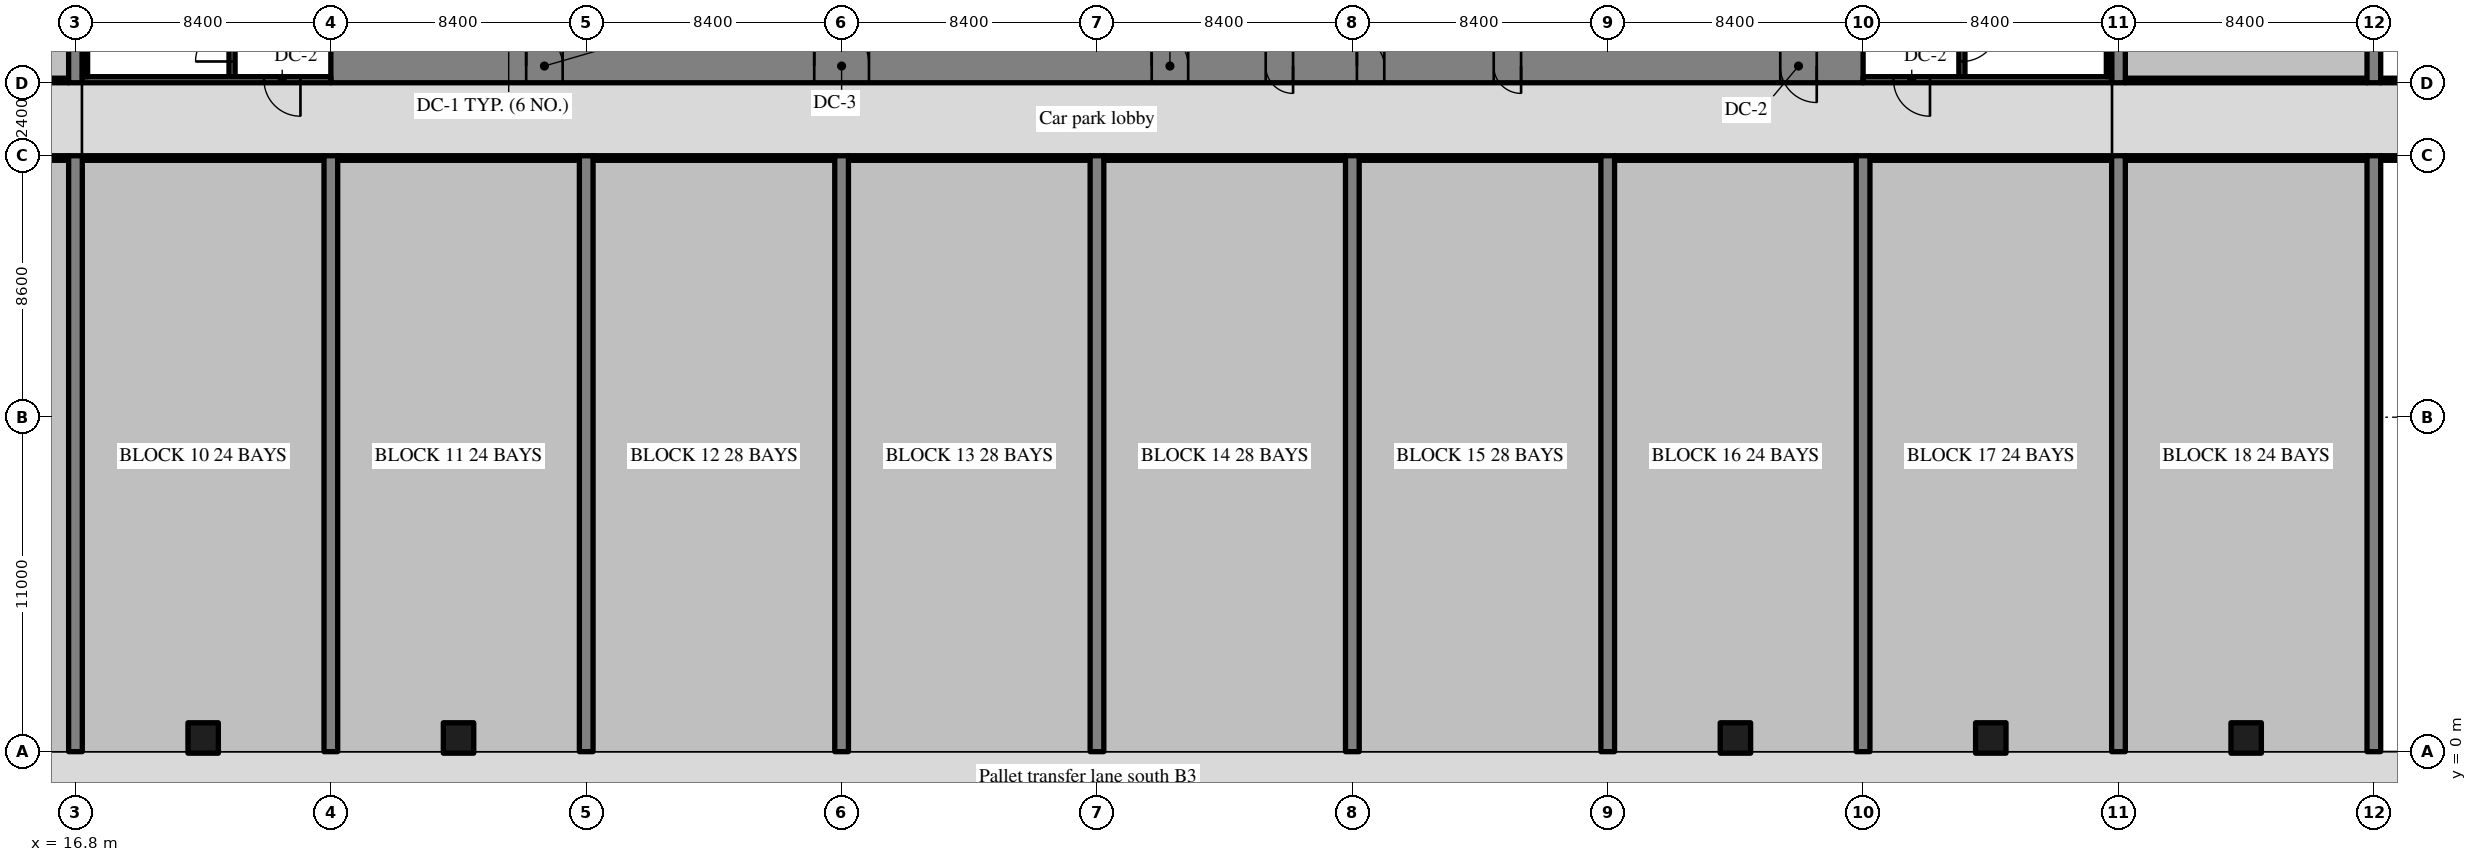
"""IFC4 building model, lengths in metres.
Left out: names, types, materials, properties, quantities, classifications, styles, units other than length and angle.
Written with IfcOpenShell. Run it as: python <this file> out.ifc"""

import sys

from ifc_helpers import new_model, si_unit, direction, frame, frame_2d, origin, origin_2d, place, context, subcontext, project, spatial, rectangle, extrude, source, transform, mapped, element, fill, save


model = new_model("IFC4")
c1 = context("Model", 3, precision=1e-05, world=origin(), true_north=direction((0.0, 1.0)))
c2 = subcontext(c1, "Body", "Model", "MODEL_VIEW")
j1 = project(units=[si_unit("LENGTHUNIT", "METRE"), si_unit("PLANEANGLEUNIT", "RADIAN")], contexts=[c1])
p1 = place(None, origin())
s1 = spatial("IfcSite", under=j1, at=p1, CompositionType="ELEMENT")
p2 = place(p1, origin())
s2 = spatial("IfcBuilding", under=s1, at=p2, CompositionType="ELEMENT")
p3 = place(p2, frame((0.0, 0.0, -13.5)))
s3 = spatial("IfcBuildingStorey", under=s2, at=p3, CompositionType="ELEMENT", Elevation=-13.5)
m1 = source(origin(), c2, "Body", "SweptSolid", [
    extrude(rectangle(XDim=50.4, YDim=1.1, at=frame_2d((25.2, 0.0))), origin(), (0.0, 0.0, 1.0), 4.52),
])
p4 = place(p3, frame((25.2, 22.55, -0.3), z_axis=(0.0, 0.0, 1.0), x_axis=(1.0, 0.0, 0.0)))
e1 = element("IfcWall", 1, at=p4, inside=s3, PredefinedType="SHEAR", context=c2, shape_type="MappedRepresentation", body=[
    mapped(m1, transform((0.0, 0.0, 0.0), scale=1.0)),
])
m2 = source(origin(), c2, "Body", "SweptSolid", [
    extrude(rectangle(XDim=1.8, YDim=2.1, at=frame_2d((0.9, 1.05))), frame((0.0, 0.56, 0.0), z_axis=(0.0, -1.0, 0.0), x_axis=(1.0, 0.0, 0.0)), (0.0, 0.0, 1.0), 1.12),
])
p5 = place(p4, frame((15.9, 0.0, 0.0)))
e2 = element("IfcOpeningElement", 2, at=p5, cuts=e1, PredefinedType="OPENING", context=c2, shape_type="MappedRepresentation", body=[
    mapped(m2, transform((0.0, 0.0, 0.0), scale=1.0)),
])
m3 = source(origin(), c2, "Body", "SweptSolid", [
    extrude(rectangle(XDim=1.2, YDim=2.1, at=frame_2d((0.6, 1.05))), frame((0.0, 0.56, 0.0), z_axis=(0.0, -1.0, 0.0), x_axis=(1.0, 0.0, 0.0)), (0.0, 0.0, 1.0), 1.12),
])
p6 = place(p4, frame((27.0, 0.0, 0.0)))
e3 = element("IfcOpeningElement", 3, at=p6, cuts=e1, PredefinedType="OPENING", context=c2, shape_type="MappedRepresentation", body=[
    mapped(m3, transform((0.0, 0.0, 0.0), scale=1.0)),
])
m4 = source(origin(), c2, "Body", "SweptSolid", [
    extrude(rectangle(XDim=0.9, YDim=2.1, at=frame_2d((0.45, 1.05))), frame((0.0, 0.56, 0.0), z_axis=(0.0, -1.0, 0.0), x_axis=(1.0, 0.0, 0.0)), (0.0, 0.0, 1.0), 1.12),
])
p7 = place(p4, frame((33.75, 0.0, 0.0)))
e4 = element("IfcOpeningElement", 4, at=p7, cuts=e1, PredefinedType="OPENING", context=c2, shape_type="MappedRepresentation", body=[
    mapped(m4, transform((0.0, 0.0, 0.0), scale=1.0)),
])
p8 = place(p4, frame((30.75, 0.0, 0.0)))
e5 = element("IfcOpeningElement", 5, at=p8, cuts=e1, PredefinedType="OPENING", context=c2, shape_type="MappedRepresentation", body=[
    mapped(m4, transform((0.0, 0.0, 0.0), scale=1.0)),
])
p9 = place(p4, frame((38.25, 0.0, 0.0)))
e6 = element("IfcOpeningElement", 6, at=p9, cuts=e1, PredefinedType="OPENING", context=c2, shape_type="MappedRepresentation", body=[
    mapped(m4, transform((0.0, 0.0, 0.0), scale=1.0)),
])
p10 = place(p4, frame((6.425, 0.0, 0.0)))
e7 = element("IfcOpeningElement", 7, at=p10, cuts=e1, PredefinedType="OPENING", context=c2, shape_type="MappedRepresentation", body=[
    mapped(m3, transform((0.0, 0.0, 0.0), scale=1.0)),
])
p11 = place(p4, frame((47.675, 0.0, 0.0)))
e8 = element("IfcOpeningElement", 8, at=p11, cuts=e1, PredefinedType="OPENING", context=c2, shape_type="MappedRepresentation", body=[
    mapped(m3, transform((0.0, 0.0, 0.0), scale=1.0)),
])
m5 = source(origin(), c2, "Body", "SweptSolid", [
    extrude(rectangle(XDim=19.6, YDim=0.45, at=frame_2d((9.8, 0.0))), origin(), (0.0, 0.0, 1.0), 4.52),
])
p12 = place(p3, frame((16.8, 0.0, -0.3), z_axis=(0.0, 0.0, 1.0), x_axis=(0.0, 1.0, 0.0)))
e9 = element("IfcWall", 9, at=p12, inside=s3, PredefinedType="SHEAR", context=c2, shape_type="MappedRepresentation", body=[
    mapped(m5, transform((0.0, 0.0, 0.0), scale=1.0)),
])
m6 = source(origin(), c2, "Body", "SweptSolid", [
    extrude(rectangle(XDim=20.0, YDim=0.45, at=frame_2d((10.0, 0.0))), origin(), (0.0, 0.0, 1.0), 4.52),
])
p13 = place(p3, frame((16.8, 22.0, -0.3), z_axis=(0.0, 0.0, 1.0), x_axis=(0.0, 1.0, 0.0)))
e10 = element("IfcWall", 10, at=p13, inside=s3, PredefinedType="SHEAR", context=c2, shape_type="MappedRepresentation", body=[
    mapped(m6, transform((0.0, 0.0, 0.0), scale=1.0)),
])
for number, where, z_axis, x_axis in (
    (11, (25.2, 0.0, -0.3), (0.0, 0.0, 1.0), (0.0, 1.0, 0.0)),
    (12, (33.6, 0.0, -0.3), (0.0, 0.0, 1.0), (0.0, 1.0, 0.0)),
    (13, (42.0, 0.0, -0.3), (0.0, 0.0, 1.0), (0.0, 1.0, 0.0)),
    (14, (50.4, 0.0, -0.3), (0.0, 0.0, 1.0), (0.0, 1.0, 0.0)),
    (15, (58.8, 0.0, -0.3), (0.0, 0.0, 1.0), (0.0, 1.0, 0.0)),
    (16, (67.2, 0.0, -0.3), (0.0, 0.0, 1.0), (0.0, 1.0, 0.0)),
    (17, (75.6, 0.0, -0.3), (0.0, 0.0, 1.0), (0.0, 1.0, 0.0)),
    (18, (84.0, 0.0, -0.3), (0.0, 0.0, 1.0), (0.0, 1.0, 0.0)),
):
    element("IfcWall", number, at=place(p3, frame(where, z_axis=z_axis, x_axis=x_axis)), inside=s3, PredefinedType="SHEAR", context=c2, shape_type="MappedRepresentation", body=[
        mapped(m5, transform((0.0, 0.0, 0.0), scale=1.0)),
    ])
p14 = place(p3, frame((84.0, 22.0, -0.3), z_axis=(0.0, 0.0, 1.0), x_axis=(0.0, 1.0, 0.0)))
e19 = element("IfcWall", 19, at=p14, inside=s3, PredefinedType="SHEAR", context=c2, shape_type="MappedRepresentation", body=[
    mapped(m6, transform((0.0, 0.0, 0.0), scale=1.0)),
])
p15 = place(p3, frame((92.4, 0.0, -0.3), z_axis=(0.0, 0.0, 1.0), x_axis=(0.0, 1.0, 0.0)))
e20 = element("IfcWall", 20, at=p15, inside=s3, PredefinedType="SHEAR", context=c2, shape_type="MappedRepresentation", body=[
    mapped(m5, transform((0.0, 0.0, 0.0), scale=1.0)),
])
p16 = place(p3, frame((92.4, 22.0, -0.3), z_axis=(0.0, 0.0, 1.0), x_axis=(0.0, 1.0, 0.0)))
e21 = element("IfcWall", 21, at=p16, inside=s3, PredefinedType="SHEAR", context=c2, shape_type="MappedRepresentation", body=[
    mapped(m6, transform((0.0, 0.0, 0.0), scale=1.0)),
])
m7 = source(origin(), c2, "Body", "SweptSolid", [
    extrude(rectangle(XDim=1.0, YDim=1.0, at=origin_2d()), origin(), (0.0, 0.0, 1.0), 4.52),
])
for number, where, z_axis, x_axis in (
    (22, (21.0, 0.45, -0.3), (0.0, 0.0, 1.0), (1.0, 0.0, 0.0)),
    (23, (29.4, 0.45, -0.3), (0.0, 0.0, 1.0), (1.0, 0.0, 0.0)),
    (24, (71.4, 0.45, -0.3), (0.0, 0.0, 1.0), (1.0, 0.0, 0.0)),
    (25, (79.8, 0.45, -0.3), (0.0, 0.0, 1.0), (1.0, 0.0, 0.0)),
    (26, (88.2, 0.45, -0.3), (0.0, 0.0, 1.0), (1.0, 0.0, 0.0)),
):
    element("IfcColumn", number, at=place(p3, frame(where, z_axis=z_axis, x_axis=x_axis)), inside=s3, PredefinedType="COLUMN", context=c2, shape_type="MappedRepresentation", body=[
        mapped(m7, transform((0.0, 0.0, 0.0), scale=1.0)),
    ])
m8 = source(origin(), c2, "Body", "SweptSolid", [
    extrude(rectangle(XDim=8.3, YDim=0.2, at=frame_2d((4.15, 0.0))), origin(), (0.0, 0.0, 1.0), 4.52),
])
p17 = place(p3, frame((21.95, 22.1, -0.3), z_axis=(0.0, 0.0, 1.0), x_axis=(0.0, 1.0, 0.0)))
e27 = element("IfcWall", 27, at=p17, inside=s3, PredefinedType="SOLIDWALL", context=c2, shape_type="MappedRepresentation", body=[
    mapped(m8, transform((0.0, 0.0, 0.0), scale=1.0)),
])
m9 = source(origin(), c2, "Body", "SweptSolid", [
    extrude(rectangle(XDim=1.2, YDim=2.1, at=frame_2d((0.6, 1.05))), frame((0.0, 0.11, 0.0), z_axis=(0.0, -1.0, 0.0), x_axis=(1.0, 0.0, 0.0)), (0.0, 0.0, 1.0), 0.22),
])
p18 = place(p17, frame((0.6, 0.0, 0.0)))
e28 = element("IfcOpeningElement", 28, at=p18, cuts=e27, PredefinedType="OPENING", context=c2, shape_type="MappedRepresentation", body=[
    mapped(m9, transform((0.0, 0.0, 0.0), scale=1.0)),
])
m10 = source(origin(), c2, "Body", "SweptSolid", [
    extrude(rectangle(XDim=8.175, YDim=0.2, at=frame_2d((4.087, 0.0))), origin(), (0.0, 0.0, 1.0), 4.52),
])
p19 = place(p3, frame((17.025, 22.1, -0.3), z_axis=(0.0, 0.0, 1.0), x_axis=(1.0, 0.0, 0.0)))
e29 = element("IfcWall", 29, at=p19, inside=s3, PredefinedType="SOLIDWALL", context=c2, shape_type="MappedRepresentation", body=[
    mapped(m10, transform((0.0, 0.0, 0.0), scale=1.0)),
])
p20 = place(p19, frame((5.975, 0.0, 0.0)))
e30 = element("IfcOpeningElement", 30, at=p20, cuts=e29, PredefinedType="OPENING", context=c2, shape_type="MappedRepresentation", body=[
    mapped(m9, transform((0.0, 0.0, 0.0), scale=1.0)),
])
p21 = place(p3, frame((78.85, 22.1, -0.3), z_axis=(0.0, 0.0, 1.0), x_axis=(0.0, 1.0, 0.0)))
e31 = element("IfcWall", 31, at=p21, inside=s3, PredefinedType="SOLIDWALL", context=c2, shape_type="MappedRepresentation", body=[
    mapped(m8, transform((0.0, 0.0, 0.0), scale=1.0)),
])
p22 = place(p21, frame((0.6, 0.0, 0.0)))
e32 = element("IfcOpeningElement", 32, at=p22, cuts=e31, PredefinedType="OPENING", context=c2, shape_type="MappedRepresentation", body=[
    mapped(m9, transform((0.0, 0.0, 0.0), scale=1.0)),
])
m11 = source(origin(), c2, "Body", "SweptSolid", [
    extrude(rectangle(XDim=8.175, YDim=0.2, at=frame_2d((4.087, 0.0))), origin(), (0.0, 0.0, 1.0), 4.52),
])
p23 = place(p3, frame((83.775, 22.1, -0.3), z_axis=(0.0, 0.0, 1.0), x_axis=(-1.0, 0.0, 0.0)))
e33 = element("IfcWall", 33, at=p23, inside=s3, PredefinedType="SOLIDWALL", context=c2, shape_type="MappedRepresentation", body=[
    mapped(m11, transform((0.0, 0.0, 0.0), scale=1.0)),
])
p24 = place(p23, frame((5.975, 0.0, 0.0)))
e34 = element("IfcOpeningElement", 34, at=p24, cuts=e33, PredefinedType="OPENING", context=c2, shape_type="MappedRepresentation", body=[
    mapped(m9, transform((0.0, 0.0, 0.0), scale=1.0)),
])
m12 = source(origin(), c2, "Body", "SweptSolid", [
    extrude(rectangle(XDim=8.1, YDim=0.175, at=frame_2d((4.05, 0.0))), origin(), (0.0, 0.0, 1.0), 4.52),
])
for number, where, z_axis, x_axis in (
    (35, (17.112, 22.2, -0.3), (0.0, 0.0, 1.0), (0.0, 1.0, 0.0)),
    (36, (83.688, 22.2, -0.3), (0.0, 0.0, 1.0), (0.0, 1.0, 0.0)),
):
    element("IfcWall", number, at=place(p3, frame(where, z_axis=z_axis, x_axis=x_axis)), inside=s3, PredefinedType="SOLIDWALL", context=c2, shape_type="MappedRepresentation", body=[
        mapped(m12, transform((0.0, 0.0, 0.0), scale=1.0)),
    ])
m13 = source(origin(), c2, "Body", "SweptSolid", [
    extrude(rectangle(XDim=7.95, YDim=0.15, at=frame_2d((3.975, 0.0))), origin(), (0.0, 0.0, 1.0), 4.22),
])
for number, where, z_axis, x_axis in (
    (37, (8.625, 19.525, 0.0), (0.0, 0.0, 1.0), (1.0, 0.0, 0.0)),
    (38, (8.625, 22.075, 0.0), (0.0, 0.0, 1.0), (1.0, 0.0, 0.0)),
):
    element("IfcWall", number, at=place(p3, frame(where, z_axis=z_axis, x_axis=x_axis)), inside=s3, PredefinedType="PARTITIONING", context=c2, shape_type="MappedRepresentation", body=[
        mapped(m13, transform((0.0, 0.0, 0.0), scale=1.0)),
    ])
m14 = source(origin(), c2, "Body", "SweptSolid", [
    extrude(rectangle(XDim=7.95, YDim=0.15, at=frame_2d((3.975, 0.0))), origin(), (0.0, 0.0, 1.0), 4.22),
])
p25 = place(p3, frame((17.025, 19.525, 0.0), z_axis=(0.0, 0.0, 1.0), x_axis=(1.0, 0.0, 0.0)))
e39 = element("IfcWall", 39, at=p25, inside=s3, PredefinedType="PARTITIONING", context=c2, shape_type="MappedRepresentation", body=[
    mapped(m14, transform((0.0, 0.0, 0.0), scale=1.0)),
])
for number, where, z_axis, x_axis in (
    (40, (25.425, 19.525, 0.0), (0.0, 0.0, 1.0), (1.0, 0.0, 0.0)),
    (41, (33.825, 19.525, 0.0), (0.0, 0.0, 1.0), (1.0, 0.0, 0.0)),
    (42, (42.225, 19.525, 0.0), (0.0, 0.0, 1.0), (1.0, 0.0, 0.0)),
    (43, (50.625, 19.525, 0.0), (0.0, 0.0, 1.0), (1.0, 0.0, 0.0)),
):
    element("IfcWall", number, at=place(p3, frame(where, z_axis=z_axis, x_axis=x_axis)), inside=s3, PredefinedType="PARTITIONING", context=c2, shape_type="MappedRepresentation", body=[
        mapped(m13, transform((0.0, 0.0, 0.0), scale=1.0)),
    ])
p26 = place(p3, frame((59.025, 19.525, 0.0), z_axis=(0.0, 0.0, 1.0), x_axis=(1.0, 0.0, 0.0)))
e44 = element("IfcWall", 44, at=p26, inside=s3, PredefinedType="PARTITIONING", context=c2, shape_type="MappedRepresentation", body=[
    mapped(m14, transform((0.0, 0.0, 0.0), scale=1.0)),
])
for number, where, z_axis, x_axis in (
    (45, (67.425, 19.525, 0.0), (0.0, 0.0, 1.0), (1.0, 0.0, 0.0)),
    (46, (75.825, 19.525, 0.0), (0.0, 0.0, 1.0), (1.0, 0.0, 0.0)),
    (47, (84.225, 19.525, 0.0), (0.0, 0.0, 1.0), (1.0, 0.0, 0.0)),
    (48, (84.225, 22.075, 0.0), (0.0, 0.0, 1.0), (1.0, 0.0, 0.0)),
):
    element("IfcWall", number, at=place(p3, frame(where, z_axis=z_axis, x_axis=x_axis)), inside=s3, PredefinedType="PARTITIONING", context=c2, shape_type="MappedRepresentation", body=[
        mapped(m13, transform((0.0, 0.0, 0.0), scale=1.0)),
    ])
m15 = source(origin(), c2, "Body", "SweptSolid", [
    extrude(rectangle(XDim=7.725, YDim=0.15, at=frame_2d((3.863, 0.0))), origin(), (0.0, 0.0, 1.0), 4.22),
])
for number, where, z_axis, x_axis in (
    (49, (92.625, 19.525, 0.0), (0.0, 0.0, 1.0), (1.0, 0.0, 0.0)),
    (50, (92.625, 22.075, 0.0), (0.0, 0.0, 1.0), (1.0, 0.0, 0.0)),
):
    element("IfcWall", number, at=place(p3, frame(where, z_axis=z_axis, x_axis=x_axis)), inside=s3, PredefinedType="PARTITIONING", context=c2, shape_type="MappedRepresentation", body=[
        mapped(m15, transform((0.0, 0.0, 0.0), scale=1.0)),
    ])
m16 = source(origin(), c2, "Body", "SweptSolid", [
    extrude(rectangle(XDim=1.8, YDim=2.1, at=frame_2d((0.9, 1.05))), frame((0.0, 0.325, 0.0), z_axis=(0.0, -1.0, 0.0), x_axis=(1.0, 0.0, 0.0)), (0.0, 0.0, 1.0), 0.05),
])
p27 = place(p5, origin())
e51 = element("IfcDoor", 51, at=p27, inside=s3, OperationType="DOUBLE_DOOR_SINGLE_SWING", PredefinedType="DOOR", context=c2, shape_type="MappedRepresentation", body=[
    mapped(m16, transform((0.0, 0.0, 0.0), scale=1.0)),
])
fill(e2, e51)
m17 = source(origin(), c2, "Body", "SweptSolid", [
    extrude(rectangle(XDim=1.2, YDim=2.1, at=frame_2d((0.6, 1.05))), frame((0.0, 0.325, 0.0), z_axis=(0.0, -1.0, 0.0), x_axis=(1.0, 0.0, 0.0)), (0.0, 0.0, 1.0), 0.05),
])
p28 = place(p6, origin())
e52 = element("IfcDoor", 52, at=p28, inside=s3, OperationType="SINGLE_SWING_LEFT", PredefinedType="DOOR", context=c2, shape_type="MappedRepresentation", body=[
    mapped(m17, transform((0.0, 0.0, 0.0), scale=1.0)),
])
fill(e3, e52)
m18 = source(origin(), c2, "Body", "SweptSolid", [
    extrude(rectangle(XDim=0.9, YDim=2.1, at=frame_2d((0.45, 1.05))), frame((0.0, 0.325, 0.0), z_axis=(0.0, -1.0, 0.0), x_axis=(1.0, 0.0, 0.0)), (0.0, 0.0, 1.0), 0.05),
])
p29 = place(p7, origin())
e53 = element("IfcDoor", 53, at=p29, inside=s3, OperationType="SINGLE_SWING_LEFT", PredefinedType="DOOR", context=c2, shape_type="MappedRepresentation", body=[
    mapped(m18, transform((0.0, 0.0, 0.0), scale=1.0)),
])
fill(e4, e53)
p30 = place(p8, origin())
e54 = element("IfcDoor", 54, at=p30, inside=s3, OperationType="SINGLE_SWING_RIGHT", PredefinedType="DOOR", context=c2, shape_type="MappedRepresentation", body=[
    mapped(m18, transform((0.0, 0.0, 0.0), scale=1.0)),
])
fill(e5, e54)
p31 = place(p9, origin())
e55 = element("IfcDoor", 55, at=p31, inside=s3, OperationType="SINGLE_SWING_RIGHT", PredefinedType="DOOR", context=c2, shape_type="MappedRepresentation", body=[
    mapped(m18, transform((0.0, 0.0, 0.0), scale=1.0)),
])
fill(e6, e55)
p32 = place(p10, origin())
e56 = element("IfcDoor", 56, at=p32, inside=s3, OperationType="SINGLE_SWING_LEFT", PredefinedType="DOOR", context=c2, shape_type="MappedRepresentation", body=[
    mapped(m17, transform((0.0, 0.0, 0.0), scale=1.0)),
])
fill(e7, e56)
p33 = place(p11, origin())
e57 = element("IfcDoor", 57, at=p33, inside=s3, OperationType="SINGLE_SWING_RIGHT", PredefinedType="DOOR", context=c2, shape_type="MappedRepresentation", body=[
    mapped(m17, transform((0.0, 0.0, 0.0), scale=1.0)),
])
fill(e8, e57)
m19 = source(origin(), c2, "Body", "SweptSolid", [
    extrude(rectangle(XDim=1.2, YDim=2.1, at=frame_2d((0.6, 1.05))), frame((0.0, 0.025, 0.0), z_axis=(0.0, -1.0, 0.0), x_axis=(1.0, 0.0, 0.0)), (0.0, 0.0, 1.0), 0.05),
])
p34 = place(p18, origin())
e58 = element("IfcDoor", 58, at=p34, inside=s3, OperationType="SINGLE_SWING_LEFT", PredefinedType="DOOR", context=c2, shape_type="MappedRepresentation", body=[
    mapped(m19, transform((0.0, 0.0, 0.0), scale=1.0)),
])
fill(e28, e58)
p35 = place(p20, origin())
e59 = element("IfcDoor", 59, at=p35, inside=s3, OperationType="SINGLE_SWING_RIGHT", PredefinedType="DOOR", context=c2, shape_type="MappedRepresentation", body=[
    mapped(m19, transform((0.0, 0.0, 0.0), scale=1.0)),
])
fill(e30, e59)
p36 = place(p22, origin())
e60 = element("IfcDoor", 60, at=p36, inside=s3, OperationType="SINGLE_SWING_RIGHT", PredefinedType="DOOR", context=c2, shape_type="MappedRepresentation", body=[
    mapped(m19, transform((0.0, 0.0, 0.0), scale=1.0)),
])
fill(e32, e60)
p37 = place(p24, origin())
e61 = element("IfcDoor", 61, at=p37, inside=s3, OperationType="SINGLE_SWING_LEFT", PredefinedType="DOOR", context=c2, shape_type="MappedRepresentation", body=[
    mapped(m19, transform((0.0, 0.0, 0.0), scale=1.0)),
])
fill(e34, e61)
save(model, sys.argv[1])
